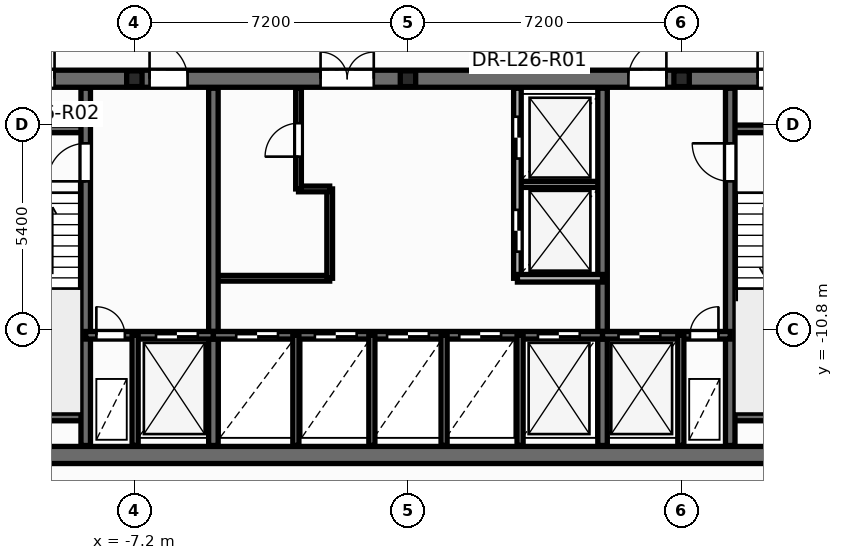
"""IFC4 building model, lengths in metres.
Left out: names, types, materials, properties, quantities, classifications, styles, units other than length and angle.
Written with IfcOpenShell. Run it as: python <this file> out.ifc"""

import sys

from ifc_helpers import new_model, si_unit, direction, frame, frame_2d, origin, origin_2d, place, context, subcontext, project, spatial, rectangle, i_section, extrude, element, fill, save


model = new_model("IFC4")
c1 = context("Model", 3, precision=1e-05, world=origin(), true_north=direction((0.0, 1.0)))
c2 = subcontext(c1, "Body", "Model", "MODEL_VIEW")
j1 = project(units=[si_unit("LENGTHUNIT", "METRE"), si_unit("PLANEANGLEUNIT", "RADIAN")], contexts=[c1])
p1 = place(None, origin())
s1 = spatial("IfcSite", under=j1, at=p1, CompositionType="ELEMENT")
p2 = place(p1, origin())
s2 = spatial("IfcBuilding", under=s1, at=p2, CompositionType="ELEMENT")
p3 = place(p2, frame((0.0, 0.0, 103.2)))
s3 = spatial("IfcBuildingStorey", under=s2, at=p3, CompositionType="ELEMENT", Elevation=103.2)
for number, where, z_axis, x_axis in (
    (1, (-7.2, -4.2, 0.0), (0.0, 0.0, 1.0), (1.0, 0.0, 0.0)),
    (2, (0.0, -4.2, 0.0), (0.0, 0.0, 1.0), (1.0, 0.0, 0.0)),
    (3, (7.2, -4.2, 0.0), (0.0, 0.0, 1.0), (1.0, 0.0, 0.0)),
):
    element("IfcColumn", number, at=place(p3, frame(where, z_axis=z_axis, x_axis=x_axis)), inside=s3, PredefinedType="PILASTER", context=c2, shape_type="SweptSolid", body=[
        extrude(i_section(OverallWidth=0.405, OverallDepth=0.414, WebThickness=0.022, FlangeThickness=0.032, at=origin_2d()), origin(), (0.0, 0.0, 1.0), 3.6),
    ])
p4 = place(p3, frame((-5.12, -9.45, 0.0), z_axis=(0.0, 0.0, 1.0), x_axis=(1.0, 0.0, 0.0)))
e4 = element("IfcWall", 4, at=p4, inside=s3, PredefinedType="PARTITIONING", context=c2, shape_type="SweptSolid", body=[
    extrude(rectangle(XDim=3.06, YDim=0.15, at=frame_2d((1.53, 0.0))), origin(), (0.0, 0.0, 1.0), 3.35),
])
p5 = place(p3, frame((-2.06, -9.45, 0.0), z_axis=(0.0, 0.0, 1.0), x_axis=(0.0, 1.0, 0.0)))
e5 = element("IfcWall", 5, at=p5, inside=s3, PredefinedType="PARTITIONING", context=c2, shape_type="SweptSolid", body=[
    extrude(rectangle(XDim=2.35, YDim=0.15, at=frame_2d((1.175, 0.0))), origin(), (0.0, 0.0, 1.0), 3.35),
])
p6 = place(p3, frame((-2.88, -7.1, 0.0), z_axis=(0.0, 0.0, 1.0), x_axis=(1.0, 0.0, 0.0)))
e6 = element("IfcWall", 6, at=p6, inside=s3, PredefinedType="PARTITIONING", context=c2, shape_type="SweptSolid", body=[
    extrude(rectangle(XDim=0.82, YDim=0.15, at=frame_2d((0.41, 0.0))), origin(), (0.0, 0.0, 1.0), 3.35),
])
p7 = place(p3, frame((-2.88, -7.1, 0.0), z_axis=(0.0, 0.0, 1.0), x_axis=(0.0, 1.0, 0.0)))
e7 = element("IfcWall", 7, at=p7, inside=s3, PredefinedType="PARTITIONING", context=c2, shape_type="SweptSolid", body=[
    extrude(rectangle(XDim=2.65, YDim=0.15, at=frame_2d((1.325, 0.0))), origin(), (0.0, 0.0, 1.0), 3.35),
])
p8 = place(p7, frame((0.85, 0.0, 0.0)))
e8 = element("IfcOpeningElement", 8, at=p8, cuts=e7, PredefinedType="OPENING", context=c2, shape_type="SweptSolid", body=[
    extrude(rectangle(XDim=0.886, YDim=2.104, at=frame_2d((0.44, 1.052))), frame((0.0, 0.085, 0.0), z_axis=(0.0, -1.0, 0.0), x_axis=(1.0, 0.0, 0.0)), (0.0, 0.0, 1.0), 0.17),
])
p9 = place(p3, frame((2.88, -6.98, 0.0), z_axis=(0.0, 0.0, 1.0), x_axis=(1.0, 0.0, 0.0)))
e9 = element("IfcWall", 9, at=p9, inside=s3, PredefinedType="PARTITIONING", context=c2, shape_type="SweptSolid", body=[
    extrude(rectangle(XDim=2.24, YDim=0.16, at=frame_2d((1.12, 0.0))), origin(), (0.0, 0.0, 1.0), 3.35),
])
p10 = place(p3, frame((-12.65, -14.1, 0.0), z_axis=(0.0, 0.0, 1.0), x_axis=(1.0, 0.0, 0.0)))
e10 = element("IfcWall", 10, at=p10, inside=s3, PredefinedType="SHEAR", context=c2, shape_type="SweptSolid", body=[
    extrude(rectangle(XDim=25.3, YDim=0.45, at=frame_2d((12.65, 0.0))), origin(), (0.0, 0.0, 1.0), 3.6),
])
p11 = place(p3, frame((-12.65, -4.2, 0.0), z_axis=(0.0, 0.0, 1.0), x_axis=(1.0, 0.0, 0.0)))
e11 = element("IfcWall", 11, at=p11, inside=s3, PredefinedType="SHEAR", context=c2, shape_type="SweptSolid", body=[
    extrude(rectangle(XDim=25.3, YDim=0.45, at=frame_2d((12.65, 0.0))), origin(), (0.0, 0.0, 1.0), 3.6),
])
p12 = place(p11, frame((0.95, 0.0, 0.0)))
e12 = element("IfcOpeningElement", 12, at=p12, cuts=e11, PredefinedType="OPENING", context=c2, shape_type="SweptSolid", body=[
    extrude(rectangle(XDim=0.756, YDim=2.054, at=frame_2d((0.375, 1.027))), frame((0.0, 0.235, 0.0), z_axis=(0.0, -1.0, 0.0), x_axis=(1.0, 0.0, 0.0)), (0.0, 0.0, 1.0), 0.47),
])
p13 = place(p11, frame((2.6, 0.0, 0.0)))
e13 = element("IfcOpeningElement", 13, at=p13, cuts=e11, PredefinedType="OPENING", context=c2, shape_type="SweptSolid", body=[
    extrude(rectangle(XDim=0.756, YDim=2.054, at=frame_2d((0.375, 1.027))), frame((0.0, 0.235, 0.0), z_axis=(0.0, -1.0, 0.0), x_axis=(1.0, 0.0, 0.0)), (0.0, 0.0, 1.0), 0.47),
])
p14 = place(p11, frame((21.85, 0.0, 0.0)))
e14 = element("IfcOpeningElement", 14, at=p14, cuts=e11, PredefinedType="OPENING", context=c2, shape_type="SweptSolid", body=[
    extrude(rectangle(XDim=0.756, YDim=2.054, at=frame_2d((0.375, 1.027))), frame((0.0, 0.235, 0.0), z_axis=(0.0, -1.0, 0.0), x_axis=(1.0, 0.0, 0.0)), (0.0, 0.0, 1.0), 0.47),
])
p15 = place(p11, frame((23.5, 0.0, 0.0)))
e15 = element("IfcOpeningElement", 15, at=p15, cuts=e11, PredefinedType="OPENING", context=c2, shape_type="SweptSolid", body=[
    extrude(rectangle(XDim=0.756, YDim=2.054, at=frame_2d((0.375, 1.027))), frame((0.0, 0.235, 0.0), z_axis=(0.0, -1.0, 0.0), x_axis=(1.0, 0.0, 0.0)), (0.0, 0.0, 1.0), 0.47),
])
p16 = place(p11, frame((5.85, 0.0, 0.0)))
e16 = element("IfcOpeningElement", 16, at=p16, cuts=e11, PredefinedType="OPENING", context=c2, shape_type="SweptSolid", body=[
    extrude(rectangle(XDim=1.006, YDim=2.104, at=frame_2d((0.5, 1.052))), frame((0.0, 0.235, 0.0), z_axis=(0.0, -1.0, 0.0), x_axis=(1.0, 0.0, 0.0)), (0.0, 0.0, 1.0), 0.47),
])
p17 = place(p11, frame((10.35, 0.0, 0.0)))
e17 = element("IfcOpeningElement", 17, at=p17, cuts=e11, PredefinedType="OPENING", context=c2, shape_type="SweptSolid", body=[
    extrude(rectangle(XDim=1.406, YDim=2.154, at=frame_2d((0.7, 1.077))), frame((0.0, 0.235, 0.0), z_axis=(0.0, -1.0, 0.0), x_axis=(1.0, 0.0, 0.0)), (0.0, 0.0, 1.0), 0.47),
])
p18 = place(p11, frame((18.45, 0.0, 0.0)))
e18 = element("IfcOpeningElement", 18, at=p18, cuts=e11, PredefinedType="OPENING", context=c2, shape_type="SweptSolid", body=[
    extrude(rectangle(XDim=1.006, YDim=2.104, at=frame_2d((0.5, 1.052))), frame((0.0, 0.235, 0.0), z_axis=(0.0, -1.0, 0.0), x_axis=(1.0, 0.0, 0.0)), (0.0, 0.0, 1.0), 0.47),
])
for number, where, z_axis, x_axis in (
    (19, (-12.35, -5.52, 0.0), (0.0, 0.0, 1.0), (1.0, 0.0, 0.0)),
    (20, (-12.35, -13.1, 0.0), (0.0, 0.0, 1.0), (1.0, 0.0, 0.0)),
    (21, (8.48, -5.52, 0.0), (0.0, 0.0, 1.0), (1.0, 0.0, 0.0)),
    (22, (8.48, -13.1, 0.0), (0.0, 0.0, 1.0), (1.0, 0.0, 0.0)),
):
    element("IfcWall", number, at=place(p3, frame(where, z_axis=z_axis, x_axis=x_axis)), inside=s3, PredefinedType="SOLIDWALL", context=c2, shape_type="SweptSolid", body=[
        extrude(rectangle(XDim=3.87, YDim=0.2, at=frame_2d((1.935, 0.0))), origin(), (0.0, 0.0, 1.0), 3.6),
    ])
p19 = place(p3, frame((-8.48, -13.85, 0.0), z_axis=(0.0, 0.0, 1.0), x_axis=(0.0, 1.0, 0.0)))
e23 = element("IfcWall", 23, at=p19, inside=s3, PredefinedType="SHEAR", context=c2, shape_type="SweptSolid", body=[
    extrude(rectangle(XDim=9.4, YDim=0.25, at=frame_2d((4.7, 0.0))), origin(), (0.0, 0.0, 1.0), 3.6),
])
p20 = place(p19, frame((6.95, 0.0, 0.0)))
e24 = element("IfcOpeningElement", 24, at=p20, cuts=e23, PredefinedType="OPENING", context=c2, shape_type="SweptSolid", body=[
    extrude(rectangle(XDim=1.006, YDim=2.104, at=frame_2d((0.5, 1.052))), frame((0.0, 0.135, 0.0), z_axis=(0.0, -1.0, 0.0), x_axis=(1.0, 0.0, 0.0)), (0.0, 0.0, 1.0), 0.27),
])
p21 = place(p3, frame((8.48, -13.85, 0.0), z_axis=(0.0, 0.0, 1.0), x_axis=(0.0, 1.0, 0.0)))
e25 = element("IfcWall", 25, at=p21, inside=s3, PredefinedType="SHEAR", context=c2, shape_type="SweptSolid", body=[
    extrude(rectangle(XDim=9.4, YDim=0.25, at=frame_2d((4.7, 0.0))), origin(), (0.0, 0.0, 1.0), 3.6),
])
p22 = place(p21, frame((6.95, 0.0, 0.0)))
e26 = element("IfcOpeningElement", 26, at=p22, cuts=e25, PredefinedType="OPENING", context=c2, shape_type="SweptSolid", body=[
    extrude(rectangle(XDim=1.006, YDim=2.104, at=frame_2d((0.5, 1.052))), frame((0.0, 0.135, 0.0), z_axis=(0.0, -1.0, 0.0), x_axis=(1.0, 0.0, 0.0)), (0.0, 0.0, 1.0), 0.27),
])
for number, where, z_axis, x_axis in (
    (27, (-5.12, -13.85, 0.0), (0.0, 0.0, 1.0), (0.0, 1.0, 0.0)),
    (28, (5.12, -13.85, 0.0), (0.0, 0.0, 1.0), (0.0, 1.0, 0.0)),
):
    element("IfcWall", number, at=place(p3, frame(where, z_axis=z_axis, x_axis=x_axis)), inside=s3, PredefinedType="SHEAR", context=c2, shape_type="SweptSolid", body=[
        extrude(rectangle(XDim=9.4, YDim=0.25, at=frame_2d((4.7, 0.0))), origin(), (0.0, 0.0, 1.0), 3.6),
    ])
p23 = place(p3, frame((-8.48, -10.95, 0.0), z_axis=(0.0, 0.0, 1.0), x_axis=(1.0, 0.0, 0.0)))
e29 = element("IfcWall", 29, at=p23, inside=s3, PredefinedType="SOLIDWALL", context=c2, shape_type="SweptSolid", body=[
    extrude(rectangle(XDim=3.36, YDim=0.2, at=frame_2d((1.68, 0.0))), origin(), (0.0, 0.0, 1.0), 3.6),
])
p24 = place(p23, frame((0.28, 0.0, 0.0)))
e30 = element("IfcOpeningElement", 30, at=p24, cuts=e29, PredefinedType="OPENING", context=c2, shape_type="SweptSolid", body=[
    extrude(rectangle(XDim=0.756, YDim=2.054, at=frame_2d((0.375, 1.027))), frame((0.0, 0.11, 0.0), z_axis=(0.0, -1.0, 0.0), x_axis=(1.0, 0.0, 0.0)), (0.0, 0.0, 1.0), 0.22),
])
p25 = place(p23, frame((1.85, 0.0, 0.0)))
e31 = element("IfcOpeningElement", 31, at=p25, cuts=e29, PredefinedType="OPENING", context=c2, shape_type="SweptSolid", body=[
    extrude(rectangle(XDim=1.106, YDim=2.104, at=frame_2d((0.55, 1.052))), frame((0.0, 0.11, 0.0), z_axis=(0.0, -1.0, 0.0), x_axis=(1.0, 0.0, 0.0)), (0.0, 0.0, 1.0), 0.22),
])
p26 = place(p3, frame((-5.12, -10.95, 0.0), z_axis=(0.0, 0.0, 1.0), x_axis=(1.0, 0.0, 0.0)))
e32 = element("IfcWall", 32, at=p26, inside=s3, PredefinedType="SOLIDWALL", context=c2, shape_type="SweptSolid", body=[
    extrude(rectangle(XDim=10.24, YDim=0.2, at=frame_2d((5.12, 0.0))), origin(), (0.0, 0.0, 1.0), 3.6),
])
p27 = place(p26, frame((0.6, 0.0, 0.0)))
e33 = element("IfcOpeningElement", 33, at=p27, cuts=e32, PredefinedType="OPENING", context=c2, shape_type="SweptSolid", body=[
    extrude(rectangle(XDim=1.106, YDim=2.104, at=frame_2d((0.55, 1.052))), frame((0.0, 0.11, 0.0), z_axis=(0.0, -1.0, 0.0), x_axis=(1.0, 0.0, 0.0)), (0.0, 0.0, 1.0), 0.22),
])
p28 = place(p26, frame((2.67, 0.0, 0.0)))
e34 = element("IfcOpeningElement", 34, at=p28, cuts=e32, PredefinedType="OPENING", context=c2, shape_type="SweptSolid", body=[
    extrude(rectangle(XDim=1.106, YDim=2.104, at=frame_2d((0.55, 1.052))), frame((0.0, 0.11, 0.0), z_axis=(0.0, -1.0, 0.0), x_axis=(1.0, 0.0, 0.0)), (0.0, 0.0, 1.0), 0.22),
])
p29 = place(p26, frame((4.57, 0.0, 0.0)))
e35 = element("IfcOpeningElement", 35, at=p29, cuts=e32, PredefinedType="OPENING", context=c2, shape_type="SweptSolid", body=[
    extrude(rectangle(XDim=1.106, YDim=2.104, at=frame_2d((0.55, 1.052))), frame((0.0, 0.11, 0.0), z_axis=(0.0, -1.0, 0.0), x_axis=(1.0, 0.0, 0.0)), (0.0, 0.0, 1.0), 0.22),
])
p30 = place(p26, frame((6.47, 0.0, 0.0)))
e36 = element("IfcOpeningElement", 36, at=p30, cuts=e32, PredefinedType="OPENING", context=c2, shape_type="SweptSolid", body=[
    extrude(rectangle(XDim=1.106, YDim=2.104, at=frame_2d((0.55, 1.052))), frame((0.0, 0.11, 0.0), z_axis=(0.0, -1.0, 0.0), x_axis=(1.0, 0.0, 0.0)), (0.0, 0.0, 1.0), 0.22),
])
p31 = place(p26, frame((8.54, 0.0, 0.0)))
e37 = element("IfcOpeningElement", 37, at=p31, cuts=e32, PredefinedType="OPENING", context=c2, shape_type="SweptSolid", body=[
    extrude(rectangle(XDim=1.106, YDim=2.104, at=frame_2d((0.55, 1.052))), frame((0.0, 0.11, 0.0), z_axis=(0.0, -1.0, 0.0), x_axis=(1.0, 0.0, 0.0)), (0.0, 0.0, 1.0), 0.22),
])
p32 = place(p3, frame((5.12, -10.95, 0.0), z_axis=(0.0, 0.0, 1.0), x_axis=(1.0, 0.0, 0.0)))
e38 = element("IfcWall", 38, at=p32, inside=s3, PredefinedType="SOLIDWALL", context=c2, shape_type="SweptSolid", body=[
    extrude(rectangle(XDim=3.36, YDim=0.2, at=frame_2d((1.68, 0.0))), origin(), (0.0, 0.0, 1.0), 3.6),
])
p33 = place(p32, frame((0.42, 0.0, 0.0)))
e39 = element("IfcOpeningElement", 39, at=p33, cuts=e38, PredefinedType="OPENING", context=c2, shape_type="SweptSolid", body=[
    extrude(rectangle(XDim=1.106, YDim=2.104, at=frame_2d((0.55, 1.052))), frame((0.0, 0.11, 0.0), z_axis=(0.0, -1.0, 0.0), x_axis=(1.0, 0.0, 0.0)), (0.0, 0.0, 1.0), 0.22),
])
p34 = place(p32, frame((2.3, 0.0, 0.0)))
e40 = element("IfcOpeningElement", 40, at=p34, cuts=e38, PredefinedType="OPENING", context=c2, shape_type="SweptSolid", body=[
    extrude(rectangle(XDim=0.756, YDim=2.054, at=frame_2d((0.375, 1.027))), frame((0.0, 0.11, 0.0), z_axis=(0.0, -1.0, 0.0), x_axis=(1.0, 0.0, 0.0)), (0.0, 0.0, 1.0), 0.22),
])
for number, where, z_axis, x_axis in (
    (41, (-7.18, -13.85, 0.0), (0.0, 0.0, 1.0), (0.0, 1.0, 0.0)),
    (42, (7.18, -13.85, 0.0), (0.0, 0.0, 1.0), (0.0, 1.0, 0.0)),
    (43, (-2.95, -13.85, 0.0), (0.0, 0.0, 1.0), (0.0, 1.0, 0.0)),
    (44, (2.95, -13.85, 0.0), (0.0, 0.0, 1.0), (0.0, 1.0, 0.0)),
):
    element("IfcWall", number, at=place(p3, frame(where, z_axis=z_axis, x_axis=x_axis)), inside=s3, PredefinedType="PARTITIONING", context=c2, shape_type="SweptSolid", body=[
        extrude(rectangle(XDim=2.9, YDim=0.16, at=frame_2d((1.45, 0.0))), origin(), (0.0, 0.0, 1.0), 2.375),
    ])
p35 = place(p3, frame((2.88, -9.45, 0.0), z_axis=(0.0, 0.0, 1.0), x_axis=(0.0, 1.0, 0.0)))
e45 = element("IfcWall", 45, at=p35, inside=s3, PredefinedType="SOLIDWALL", context=c2, shape_type="SweptSolid", body=[
    extrude(rectangle(XDim=5.0, YDim=0.2, at=frame_2d((2.5, 0.0))), origin(), (0.0, 0.0, 1.0), 3.35),
])
p36 = place(p35, frame((0.7, 0.0, 0.0)))
e46 = element("IfcOpeningElement", 46, at=p36, cuts=e45, PredefinedType="OPENING", context=c2, shape_type="SweptSolid", body=[
    extrude(rectangle(XDim=1.106, YDim=2.104, at=frame_2d((0.55, 1.052))), frame((0.0, 0.11, 0.0), z_axis=(0.0, -1.0, 0.0), x_axis=(1.0, 0.0, 0.0)), (0.0, 0.0, 1.0), 0.22),
])
p37 = place(p35, frame((3.15, 0.0, 0.0)))
e47 = element("IfcOpeningElement", 47, at=p37, cuts=e45, PredefinedType="OPENING", context=c2, shape_type="SweptSolid", body=[
    extrude(rectangle(XDim=1.106, YDim=2.104, at=frame_2d((0.55, 1.052))), frame((0.0, 0.11, 0.0), z_axis=(0.0, -1.0, 0.0), x_axis=(1.0, 0.0, 0.0)), (0.0, 0.0, 1.0), 0.22),
])
p38 = place(p3, frame((2.88, -9.45, 0.0), z_axis=(0.0, 0.0, 1.0), x_axis=(1.0, 0.0, 0.0)))
e48 = element("IfcWall", 48, at=p38, inside=s3, PredefinedType="SOLIDWALL", context=c2, shape_type="SweptSolid", body=[
    extrude(rectangle(XDim=2.24, YDim=0.2, at=frame_2d((1.12, 0.0))), origin(), (0.0, 0.0, 1.0), 3.35),
])
for number, where, z_axis, x_axis in (
    (49, (-0.95, -13.85, 0.0), (0.0, 0.0, 1.0), (0.0, 1.0, 0.0)),
    (50, (0.95, -13.85, 0.0), (0.0, 0.0, 1.0), (0.0, 1.0, 0.0)),
):
    element("IfcWall", number, at=place(p3, frame(where, z_axis=z_axis, x_axis=x_axis)), inside=s3, PredefinedType="PARTITIONING", context=c2, shape_type="SweptSolid", body=[
        extrude(rectangle(XDim=2.9, YDim=0.16, at=frame_2d((1.45, 0.0))), origin(), (0.0, 0.0, 1.0), 2.375),
    ])
p39 = place(p8, origin())
e51 = element("IfcDoor", 51, at=p39, inside=s3, OperationType="SINGLE_SWING_LEFT", PredefinedType="DOOR", context=c2, shape_type="SweptSolid", body=[
    extrude(rectangle(XDim=0.88, YDim=2.1, at=frame_2d((0.44, 1.05))), frame((0.0, 0.025, 0.0), z_axis=(0.0, -1.0, 0.0), x_axis=(1.0, 0.0, 0.0)), (0.0, 0.0, 1.0), 0.05),
])
fill(e8, e51)
p40 = place(p36, origin())
e52 = element("IfcDoor", 52, at=p40, inside=s3, OperationType="DOUBLE_DOOR_SLIDING", PredefinedType="DOOR", context=c2, shape_type="SweptSolid", body=[
    extrude(rectangle(XDim=1.1, YDim=2.1, at=frame_2d((0.55, 1.05))), frame((0.0, 0.025, 0.0), z_axis=(0.0, -1.0, 0.0), x_axis=(1.0, 0.0, 0.0)), (0.0, 0.0, 1.0), 0.05),
])
fill(e46, e52)
p41 = place(p37, origin())
e53 = element("IfcDoor", 53, at=p41, inside=s3, OperationType="DOUBLE_DOOR_SLIDING", PredefinedType="DOOR", context=c2, shape_type="SweptSolid", body=[
    extrude(rectangle(XDim=1.1, YDim=2.1, at=frame_2d((0.55, 1.05))), frame((0.0, 0.025, 0.0), z_axis=(0.0, -1.0, 0.0), x_axis=(1.0, 0.0, 0.0)), (0.0, 0.0, 1.0), 0.05),
])
fill(e47, e53)
p42 = place(p20, origin())
e54 = element("IfcDoor", 54, at=p42, inside=s3, OperationType="SINGLE_SWING_LEFT", PredefinedType="DOOR", context=c2, shape_type="SweptSolid", body=[
    extrude(rectangle(XDim=1.0, YDim=2.1, at=frame_2d((0.5, 1.05))), frame((0.0, 0.025, 0.0), z_axis=(0.0, -1.0, 0.0), x_axis=(1.0, 0.0, 0.0)), (0.0, 0.0, 1.0), 0.05),
])
fill(e24, e54)
p43 = place(p22, origin())
e55 = element("IfcDoor", 55, at=p43, inside=s3, OperationType="SINGLE_SWING_RIGHT", PredefinedType="DOOR", context=c2, shape_type="SweptSolid", body=[
    extrude(rectangle(XDim=1.0, YDim=2.1, at=frame_2d((0.5, 1.05))), frame((0.0, 0.025, 0.0), z_axis=(0.0, -1.0, 0.0), x_axis=(1.0, 0.0, 0.0)), (0.0, 0.0, 1.0), 0.05),
])
fill(e26, e55)
p44 = place(p24, origin())
e56 = element("IfcDoor", 56, at=p44, inside=s3, OperationType="SINGLE_SWING_LEFT", PredefinedType="DOOR", context=c2, shape_type="SweptSolid", body=[
    extrude(rectangle(XDim=0.75, YDim=2.05, at=frame_2d((0.375, 1.025))), frame((0.0, 0.025, 0.0), z_axis=(0.0, -1.0, 0.0), x_axis=(1.0, 0.0, 0.0)), (0.0, 0.0, 1.0), 0.05),
])
fill(e30, e56)
p45 = place(p25, origin())
e57 = element("IfcDoor", 57, at=p45, inside=s3, OperationType="DOUBLE_DOOR_SLIDING", PredefinedType="DOOR", context=c2, shape_type="SweptSolid", body=[
    extrude(rectangle(XDim=1.1, YDim=2.1, at=frame_2d((0.55, 1.05))), frame((0.0, 0.025, 0.0), z_axis=(0.0, -1.0, 0.0), x_axis=(1.0, 0.0, 0.0)), (0.0, 0.0, 1.0), 0.05),
])
fill(e31, e57)
p46 = place(p33, origin())
e58 = element("IfcDoor", 58, at=p46, inside=s3, OperationType="DOUBLE_DOOR_SLIDING", PredefinedType="DOOR", context=c2, shape_type="SweptSolid", body=[
    extrude(rectangle(XDim=1.1, YDim=2.1, at=frame_2d((0.55, 1.05))), frame((0.0, 0.025, 0.0), z_axis=(0.0, -1.0, 0.0), x_axis=(1.0, 0.0, 0.0)), (0.0, 0.0, 1.0), 0.05),
])
fill(e39, e58)
p47 = place(p34, origin())
e59 = element("IfcDoor", 59, at=p47, inside=s3, OperationType="SINGLE_SWING_RIGHT", PredefinedType="DOOR", context=c2, shape_type="SweptSolid", body=[
    extrude(rectangle(XDim=0.75, YDim=2.05, at=frame_2d((0.375, 1.025))), frame((0.0, 0.025, 0.0), z_axis=(0.0, -1.0, 0.0), x_axis=(1.0, 0.0, 0.0)), (0.0, 0.0, 1.0), 0.05),
])
fill(e40, e59)
p48 = place(p27, origin())
e60 = element("IfcDoor", 60, at=p48, inside=s3, OperationType="DOUBLE_DOOR_SLIDING", PredefinedType="DOOR", context=c2, shape_type="SweptSolid", body=[
    extrude(rectangle(XDim=1.1, YDim=2.1, at=frame_2d((0.55, 1.05))), frame((0.0, 0.025, 0.0), z_axis=(0.0, -1.0, 0.0), x_axis=(1.0, 0.0, 0.0)), (0.0, 0.0, 1.0), 0.05),
])
fill(e33, e60)
p49 = place(p28, origin())
e61 = element("IfcDoor", 61, at=p49, inside=s3, OperationType="DOUBLE_DOOR_SLIDING", PredefinedType="DOOR", context=c2, shape_type="SweptSolid", body=[
    extrude(rectangle(XDim=1.1, YDim=2.1, at=frame_2d((0.55, 1.05))), frame((0.0, 0.025, 0.0), z_axis=(0.0, -1.0, 0.0), x_axis=(1.0, 0.0, 0.0)), (0.0, 0.0, 1.0), 0.05),
])
fill(e34, e61)
p50 = place(p29, origin())
e62 = element("IfcDoor", 62, at=p50, inside=s3, OperationType="DOUBLE_DOOR_SLIDING", PredefinedType="DOOR", context=c2, shape_type="SweptSolid", body=[
    extrude(rectangle(XDim=1.1, YDim=2.1, at=frame_2d((0.55, 1.05))), frame((0.0, 0.025, 0.0), z_axis=(0.0, -1.0, 0.0), x_axis=(1.0, 0.0, 0.0)), (0.0, 0.0, 1.0), 0.05),
])
fill(e35, e62)
p51 = place(p30, origin())
e63 = element("IfcDoor", 63, at=p51, inside=s3, OperationType="DOUBLE_DOOR_SLIDING", PredefinedType="DOOR", context=c2, shape_type="SweptSolid", body=[
    extrude(rectangle(XDim=1.1, YDim=2.1, at=frame_2d((0.55, 1.05))), frame((0.0, 0.025, 0.0), z_axis=(0.0, -1.0, 0.0), x_axis=(1.0, 0.0, 0.0)), (0.0, 0.0, 1.0), 0.05),
])
fill(e36, e63)
p52 = place(p31, origin())
e64 = element("IfcDoor", 64, at=p52, inside=s3, OperationType="DOUBLE_DOOR_SLIDING", PredefinedType="DOOR", context=c2, shape_type="SweptSolid", body=[
    extrude(rectangle(XDim=1.1, YDim=2.1, at=frame_2d((0.55, 1.05))), frame((0.0, 0.025, 0.0), z_axis=(0.0, -1.0, 0.0), x_axis=(1.0, 0.0, 0.0)), (0.0, 0.0, 1.0), 0.05),
])
fill(e37, e64)
p53 = place(p13, origin())
e65 = element("IfcDoor", 65, at=p53, inside=s3, OperationType="SINGLE_SWING_RIGHT", PredefinedType="DOOR", context=c2, shape_type="SweptSolid", body=[
    extrude(rectangle(XDim=0.75, YDim=2.05, at=frame_2d((0.375, 1.025))), frame((0.0, 0.025, 0.0), z_axis=(0.0, -1.0, 0.0), x_axis=(1.0, 0.0, 0.0)), (0.0, 0.0, 1.0), 0.05),
])
fill(e13, e65)
p54 = place(p14, origin())
e66 = element("IfcDoor", 66, at=p54, inside=s3, OperationType="SINGLE_SWING_LEFT", PredefinedType="DOOR", context=c2, shape_type="SweptSolid", body=[
    extrude(rectangle(XDim=0.75, YDim=2.05, at=frame_2d((0.375, 1.025))), frame((0.0, 0.025, 0.0), z_axis=(0.0, -1.0, 0.0), x_axis=(1.0, 0.0, 0.0)), (0.0, 0.0, 1.0), 0.05),
])
fill(e14, e66)
p55 = place(p16, origin())
e67 = element("IfcDoor", 67, at=p55, inside=s3, OperationType="SINGLE_SWING_LEFT", PredefinedType="DOOR", context=c2, shape_type="SweptSolid", body=[
    extrude(rectangle(XDim=1.0, YDim=2.1, at=frame_2d((0.5, 1.05))), frame((0.0, 0.025, 0.0), z_axis=(0.0, -1.0, 0.0), x_axis=(1.0, 0.0, 0.0)), (0.0, 0.0, 1.0), 0.05),
])
fill(e16, e67)
p56 = place(p17, origin())
e68 = element("IfcDoor", 68, at=p56, inside=s3, OperationType="DOUBLE_DOOR_SINGLE_SWING", PredefinedType="DOOR", context=c2, shape_type="SweptSolid", body=[
    extrude(rectangle(XDim=1.4, YDim=2.15, at=frame_2d((0.7, 1.075))), frame((0.0, 0.025, 0.0), z_axis=(0.0, -1.0, 0.0), x_axis=(1.0, 0.0, 0.0)), (0.0, 0.0, 1.0), 0.05),
])
fill(e17, e68)
p57 = place(p18, origin())
e69 = element("IfcDoor", 69, at=p57, inside=s3, OperationType="SINGLE_SWING_RIGHT", PredefinedType="DOOR", context=c2, shape_type="SweptSolid", body=[
    extrude(rectangle(XDim=1.0, YDim=2.1, at=frame_2d((0.5, 1.05))), frame((0.0, 0.025, 0.0), z_axis=(0.0, -1.0, 0.0), x_axis=(1.0, 0.0, 0.0)), (0.0, 0.0, 1.0), 0.05),
])
fill(e18, e69)
save(model, sys.argv[1])
